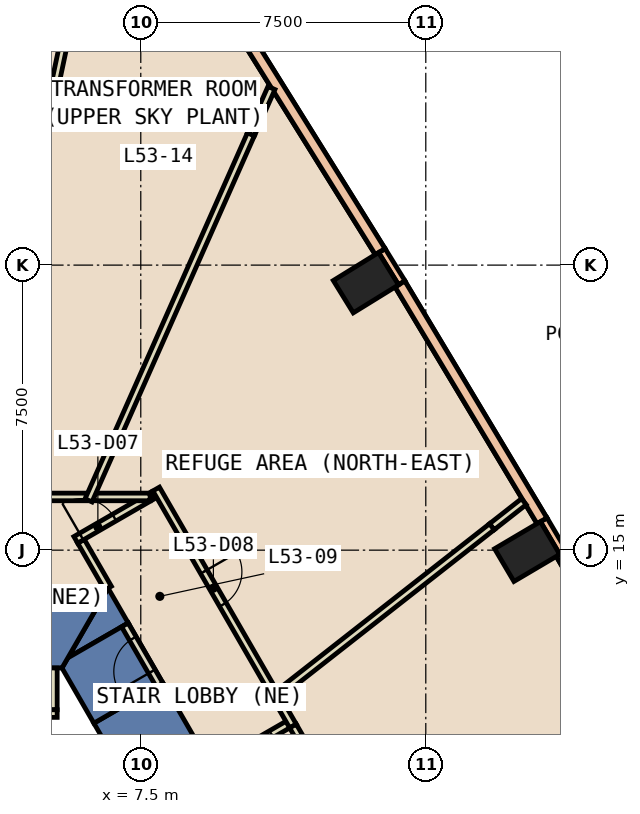
"""IFC4 building model, lengths in metres.
Left out: names, types, materials, properties, quantities, classifications, styles, units other than length and angle.
Written with IfcOpenShell. Run it as: python <this file> out.ifc"""

import sys

from ifc_helpers import new_model, si_unit, direction, frame, frame_2d, origin, origin_2d, place, context, subcontext, project, spatial, polyline, rectangle, outline, extrude, element, fill, save


model = new_model("IFC4")
c1 = context("Model", 3, precision=1e-05, world=origin(), true_north=direction((0.0, 1.0)))
c2 = subcontext(c1, "Body", "Model", "MODEL_VIEW")
j1 = project(units=[si_unit("LENGTHUNIT", "METRE"), si_unit("PLANEANGLEUNIT", "RADIAN")], contexts=[c1])
p1 = place(None, origin())
s1 = spatial("IfcSite", under=j1, at=p1, CompositionType="ELEMENT")
p2 = place(p1, origin())
s2 = spatial("IfcBuilding", under=s1, at=p2, CompositionType="ELEMENT")
p3 = place(p2, frame((0.0, 0.0, 236.0)))
s3 = spatial("IfcBuildingStorey", under=s2, at=p3, CompositionType="ELEMENT", Elevation=236.0)
for number, where, z_axis, x_axis in (
    (1, (17.668, 14.963, -0.6), (0.0, 0.0, 1.0), (-0.509, 0.861, 0.0)),
    (2, (13.425, 22.037, -0.6), (0.0, 0.0, 1.0), (-0.525, 0.851, 0.0)),
):
    element("IfcColumn", number, at=place(p3, frame(where, z_axis=z_axis, x_axis=x_axis)), inside=s3, PredefinedType="COLUMN", context=c2, shape_type="SweptSolid", body=[
        extrude(rectangle(XDim=1.0, YDim=1.4, at=origin_2d()), origin(), (0.0, 0.0, 1.0), 5.4),
    ])
p4 = place(p3, frame((0.0, 0.0, -0.6)))
e3 = element("IfcWall", 3, at=p4, inside=s3, PredefinedType="SHEAR", context=c2, shape_type="SweptSolid", body=[
    extrude(outline(polyline([(8.085, 11.498), (6.266, 10.447), (10.854, 2.5), (13.279, 2.5), (8.085, 11.498)])), origin(), (0.0, 0.0, 1.0), 5.4),
])
p5 = place(p3, frame((0.0, 0.0, -0.6)))
e4 = element("IfcWall", 4, at=p5, inside=s3, PredefinedType="SHEAR", context=c2, shape_type="SweptSolid", body=[
    extrude(outline(polyline([(5.58, 12.165), (7.17, 13.083), (6.64, 14.0), (5.58, 12.165)])), origin(), (0.0, 0.0, 1.0), 5.4),
])
p6 = place(p3, frame((0.0, 0.0, 3.6)))
e5 = element("IfcWall", 5, at=p6, inside=s3, PredefinedType="SHEAR", context=c2, shape_type="SweptSolid", body=[
    extrude(outline(polyline([(7.17, 13.083), (5.58, 12.165), (5.427, 11.9), (6.266, 10.447), (8.085, 11.498), (7.17, 13.083)])), origin(), (0.0, 0.0, 1.0), 1.2),
])
p7 = place(p3, frame((0.0, 0.0, -0.6)))
e6 = element("IfcWall", 6, at=p7, inside=s3, PredefinedType="SHEAR", context=c2, shape_type="SweptSolid", body=[
    extrude(outline(polyline([(6.64, 14.0), (-6.64, 14.0), (-5.427, 11.9), (5.427, 11.9), (6.64, 14.0)])), origin(), (0.0, 0.0, 1.0), 5.4),
])
p8 = place(p3, frame((18.611, 14.94, 0.0), z_axis=(0.0, 0.0, 1.0), x_axis=(-0.508161541526, 0.861261776531, 0.0)))
e7 = element("IfcWall", 7, at=p8, inside=s3, PredefinedType="STANDARD", context=c2, shape_type="SweptSolid", body=[
    extrude(rectangle(XDim=1.0, YDim=0.2, at=frame_2d((0.5, 0.0))), origin(), (0.0, 0.0, 1.0), 4.8),
])
p9 = place(p3, frame((14.369, 22.032, 0.0), z_axis=(0.0, 0.0, 1.0), x_axis=(-0.525648735675, 0.850701714282, 0.0)))
e8 = element("IfcWall", 8, at=p9, inside=s3, PredefinedType="STANDARD", context=c2, shape_type="SweptSolid", body=[
    extrude(rectangle(XDim=1.0, YDim=0.2, at=frame_2d((0.5, 0.0))), origin(), (0.0, 0.0, 1.0), 4.8),
])
p10 = place(p3, frame((22.196, 8.62, 0.0), z_axis=(0.0, 0.0, 1.0), x_axis=(-0.499980331134, 0.866036759312, 0.0)))
e9 = element("IfcWall", 9, at=p10, inside=s3, PredefinedType="STANDARD", context=c2, shape_type="SweptSolid", body=[
    extrude(rectangle(XDim=7.266, YDim=0.3, at=frame_2d((3.633, 0.0))), origin(), (0.0, 0.0, 1.0), 1.2),
])
p11 = place(p3, frame((22.196, 8.62, 4.0), z_axis=(0.0, 0.0, 1.0), x_axis=(-0.499980331134, 0.866036759312, 0.0)))
e10 = element("IfcWall", 10, at=p11, inside=s3, PredefinedType="STANDARD", context=c2, shape_type="SweptSolid", body=[
    extrude(rectangle(XDim=7.266, YDim=0.3, at=frame_2d((3.633, 0.0))), origin(), (0.0, 0.0, 1.0), 0.8),
])
p12 = place(p3, frame((18.057, 15.773, 0.0), z_axis=(0.0, 0.0, 1.0), x_axis=(-0.51437714024, 0.857564083669, 0.0)))
e11 = element("IfcWall", 11, at=p12, inside=s3, PredefinedType="STANDARD", context=c2, shape_type="SweptSolid", body=[
    extrude(rectangle(XDim=7.265, YDim=0.3, at=frame_2d((3.632, 0.0))), origin(), (0.0, 0.0, 1.0), 1.2),
])
p13 = place(p3, frame((18.057, 15.773, 4.0), z_axis=(0.0, 0.0, 1.0), x_axis=(-0.51437714024, 0.857564083669, 0.0)))
e12 = element("IfcWall", 12, at=p13, inside=s3, PredefinedType="STANDARD", context=c2, shape_type="SweptSolid", body=[
    extrude(rectangle(XDim=7.265, YDim=0.3, at=frame_2d((3.632, 0.0))), origin(), (0.0, 0.0, 1.0), 0.8),
])
p14 = place(p3, frame((13.799, 22.855, 0.0), z_axis=(0.0, 0.0, 1.0), x_axis=(-0.528961462244, 0.848645845722, 0.0)))
e13 = element("IfcWall", 13, at=p14, inside=s3, PredefinedType="STANDARD", context=c2, shape_type="SweptSolid", body=[
    extrude(rectangle(XDim=7.47, YDim=0.3, at=frame_2d((3.735, 0.0))), origin(), (0.0, 0.0, 1.0), 1.2),
])
p15 = place(p3, frame((13.799, 22.855, 4.0), z_axis=(0.0, 0.0, 1.0), x_axis=(-0.528961462244, 0.848645845722, 0.0)))
e14 = element("IfcWall", 14, at=p15, inside=s3, PredefinedType="STANDARD", context=c2, shape_type="SweptSolid", body=[
    extrude(rectangle(XDim=7.47, YDim=0.3, at=frame_2d((3.735, 0.0))), origin(), (0.0, 0.0, 1.0), 0.8),
])
p16 = place(p3, frame((5.2, 11.9, 0.0), z_axis=(0.0, 0.0, 1.0), x_axis=(0.0, -1.0, 0.0)))
e15 = element("IfcWall", 15, at=p16, inside=s3, PredefinedType="PARTITIONING", context=c2, shape_type="SweptSolid", body=[
    extrude(rectangle(XDim=1.1, YDim=0.2, at=frame_2d((0.55, 0.0))), origin(), (0.0, 0.0, 1.0), 4.8),
])
p17 = place(p3, frame((5.3, 10.7, 0.0), z_axis=(0.0, 0.0, 1.0), x_axis=(-1.0, 0.0, 0.0)))
e16 = element("IfcWall", 16, at=p17, inside=s3, PredefinedType="PARTITIONING", context=c2, shape_type="SweptSolid", body=[
    extrude(rectangle(XDim=2.8, YDim=0.2, at=frame_2d((1.4, 0.0))), origin(), (0.0, 0.0, 1.0), 4.8),
])
p18 = place(p17, frame((0.95, 0.0, 0.0)))
e17 = element("IfcOpeningElement", 17, at=p18, cuts=e16, PredefinedType="OPENING", context=c2, shape_type="SweptSolid", body=[
    extrude(rectangle(XDim=0.9, YDim=2.1, at=frame_2d((0.45, 1.05))), frame((0.0, 0.11, 0.0), z_axis=(0.0, -1.0, 0.0), x_axis=(1.0, 0.0, 0.0)), (0.0, 0.0, 1.0), 0.22),
])
p19 = place(p3, frame((11.455, 10.459, 0.0), z_axis=(0.0, 0.0, 1.0), x_axis=(-0.865999212041, -0.500045362686, 0.0)))
e18 = element("IfcWall", 18, at=p19, inside=s3, PredefinedType="PARTITIONING", context=c2, shape_type="SweptSolid", body=[
    extrude(rectangle(XDim=2.4, YDim=0.2, at=frame_2d((1.2, 0.0))), origin(), (0.0, 0.0, 1.0), 2.4),
])
p20 = place(p19, frame((0.6, 0.0, 0.0)))
e19 = element("IfcOpeningElement", 19, at=p20, cuts=e18, PredefinedType="OPENING", context=c2, shape_type="SweptSolid", body=[
    extrude(rectangle(XDim=1.0, YDim=2.1, at=frame_2d((0.5, 1.05))), frame((0.0, 0.11, 0.0), z_axis=(0.0, -1.0, 0.0), x_axis=(1.0, 0.0, 0.0)), (0.0, 0.0, 1.0), 0.22),
])
p21 = place(p3, frame((6.64, 14.0, 0.0), z_axis=(0.0, 0.0, 1.0), x_axis=(-0.500266180458, 0.865871669874, 0.0)))
e20 = element("IfcWall", 20, at=p21, inside=s3, PredefinedType="PARTITIONING", context=c2, shape_type="SweptSolid", body=[
    extrude(rectangle(XDim=1.425, YDim=0.2, at=frame_2d((0.712, 0.0))), origin(), (0.0, 0.0, 1.0), 4.8),
])
p22 = place(p3, frame((5.79, 15.271, 0.0), z_axis=(0.0, 0.0, 1.0), x_axis=(0.866023505087, 0.500003288626, 0.0)))
e21 = element("IfcWall", 21, at=p22, inside=s3, PredefinedType="PARTITIONING", context=c2, shape_type="SweptSolid", body=[
    extrude(rectangle(XDim=2.358, YDim=0.2, at=frame_2d((1.179, 0.0))), origin(), (0.0, 0.0, 1.0), 4.8),
])
p23 = place(p22, frame((0.171, 0.0, 0.0)))
e22 = element("IfcOpeningElement", 22, at=p23, cuts=e21, PredefinedType="OPENING", context=c2, shape_type="SweptSolid", body=[
    extrude(rectangle(XDim=1.0, YDim=2.1, at=frame_2d((0.5, 1.05))), frame((0.0, 0.11, 0.0), z_axis=(0.0, -1.0, 0.0), x_axis=(1.0, 0.0, 0.0)), (0.0, 0.0, 1.0), 0.22),
])
p24 = place(p3, frame((7.905, 16.608, 0.0), z_axis=(0.0, 0.0, 1.0), x_axis=(0.499957262057, -0.866050077142, 0.0)))
e23 = element("IfcWall", 23, at=p24, inside=s3, PredefinedType="PARTITIONING", context=c2, shape_type="SweptSolid", body=[
    extrude(rectangle(XDim=7.2, YDim=0.2, at=frame_2d((3.6, 0.0))), origin(), (0.0, 0.0, 1.0), 4.8),
])
p25 = place(p24, frame((2.512, 0.0, 0.0)))
e24 = element("IfcOpeningElement", 24, at=p25, cuts=e23, PredefinedType="OPENING", context=c2, shape_type="SweptSolid", body=[
    extrude(rectangle(XDim=1.0, YDim=2.1, at=frame_2d((0.5, 1.05))), frame((0.0, 0.11, 0.0), z_axis=(0.0, -1.0, 0.0), x_axis=(1.0, 0.0, 0.0)), (0.0, 0.0, 1.0), 0.22),
])
p26 = place(p3, frame((11.505, 10.372, 0.0), z_axis=(0.0, 0.0, 1.0), x_axis=(0.500335529221, -0.865831599215, 0.0)))
e25 = element("IfcWall", 25, at=p26, inside=s3, PredefinedType="PARTITIONING", context=c2, shape_type="SweptSolid", body=[
    extrude(rectangle(XDim=0.632, YDim=0.2, at=frame_2d((0.316, 0.0))), origin(), (0.0, 0.0, 1.0), 2.4),
])
p27 = place(p3, frame((6.266, 16.4, 0.0), z_axis=(0.0, 0.0, 1.0), x_axis=(1.0, 0.0, 0.0)))
e26 = element("IfcWall", 26, at=p27, inside=s3, PredefinedType="PARTITIONING", context=c2, shape_type="SweptSolid", body=[
    extrude(rectangle(XDim=1.479, YDim=0.2, at=frame_2d((0.74, 0.0))), origin(), (0.0, 0.0, 1.0), 4.8),
])
p28 = place(p3, frame((3.044, 16.4, 0.0), z_axis=(0.0, 0.0, 1.0), x_axis=(1.0, 0.0, 0.0)))
e27 = element("IfcWall", 27, at=p28, inside=s3, PredefinedType="PARTITIONING", context=c2, shape_type="SweptSolid", body=[
    extrude(rectangle(XDim=3.022, YDim=0.2, at=frame_2d((1.511, 0.0))), origin(), (0.0, 0.0, 1.0), 4.8),
])
p29 = place(p28, frame((0.844, 0.0, 0.0)))
e28 = element("IfcOpeningElement", 28, at=p29, cuts=e27, PredefinedType="OPENING", context=c2, shape_type="SweptSolid", body=[
    extrude(rectangle(XDim=1.0, YDim=2.1, at=frame_2d((0.5, 1.05))), frame((0.0, 0.11, 0.0), z_axis=(0.0, -1.0, 0.0), x_axis=(1.0, 0.0, 0.0)), (0.0, 0.0, 1.0), 0.22),
])
p30 = place(p3, frame((17.581, 16.276, 0.0), z_axis=(0.0, 0.0, 1.0), x_axis=(-0.78699011443, -0.61696560665, 0.0)))
e29 = element("IfcWall", 29, at=p30, inside=s3, PredefinedType="PARTITIONING", context=c2, shape_type="SweptSolid", body=[
    extrude(rectangle(XDim=1.071, YDim=0.2, at=frame_2d((0.536, 0.0))), origin(), (0.0, 0.0, 1.0), 2.4),
])
p31 = place(p3, frame((6.125, 16.309, 0.0), z_axis=(0.0, 0.0, 1.0), x_axis=(0.405480740136, 0.914103587882, 0.0)))
e30 = element("IfcWall", 30, at=p31, inside=s3, PredefinedType="PARTITIONING", context=c2, shape_type="SweptSolid", body=[
    extrude(rectangle(XDim=10.54, YDim=0.2, at=frame_2d((5.27, 0.0))), origin(), (0.0, 0.0, 1.0), 4.8),
])
p32 = place(p3, frame((7.998, 11.448, 0.0), z_axis=(0.0, 0.0, 1.0), x_axis=(-0.500215337403, 0.865901042976, 0.0)))
e31 = element("IfcWall", 31, at=p32, inside=s3, PredefinedType="PARTITIONING", context=c2, shape_type="SweptSolid", body=[
    extrude(rectangle(XDim=1.829, YDim=0.2, at=frame_2d((0.915, 0.0))), origin(), (0.0, 0.0, 1.0), 2.4),
])
p33 = place(p32, frame((0.415, 0.0, 0.0)))
e32 = element("IfcOpeningElement", 32, at=p33, cuts=e31, PredefinedType="OPENING", context=c2, shape_type="SweptSolid", body=[
    extrude(rectangle(XDim=1.0, YDim=2.1, at=frame_2d((0.5, 1.05))), frame((0.0, 0.11, 0.0), z_axis=(0.0, -1.0, 0.0), x_axis=(1.0, 0.0, 0.0)), (0.0, 0.0, 1.0), 0.22),
])
p34 = place(p3, frame((16.738, 15.615, 0.0), z_axis=(0.0, 0.0, 1.0), x_axis=(-0.787145477979, -0.616767376323, 0.0)))
e33 = element("IfcWall", 33, at=p34, inside=s3, PredefinedType="PARTITIONING", context=c2, shape_type="SweptSolid", body=[
    extrude(rectangle(XDim=7.225, YDim=0.2, at=frame_2d((3.612, 0.0))), origin(), (0.0, 0.0, 1.0), 4.8),
])
p35 = place(p3, frame((10.399, 25.944, 0.0), z_axis=(0.0, 0.0, 1.0), x_axis=(0.405661971111, 0.914023175414, 0.0)))
e34 = element("IfcWall", 34, at=p35, inside=s3, PredefinedType="PARTITIONING", context=c2, shape_type="SweptSolid", body=[
    extrude(rectangle(XDim=1.331, YDim=0.2, at=frame_2d((0.666, 0.0))), origin(), (0.0, 0.0, 1.0), 2.4),
])
p36 = place(p3, frame((4.078, 21.753, 0.0), z_axis=(0.0, 0.0, 1.0), x_axis=(0.207313040937, 0.978274656248, 0.0)))
e35 = element("IfcWall", 35, at=p36, inside=s3, PredefinedType="PARTITIONING", context=c2, shape_type="SweptSolid", body=[
    extrude(rectangle(XDim=10.333, YDim=0.2, at=frame_2d((5.166, 0.0))), origin(), (0.0, 0.0, 1.0), 4.8),
])
p37 = place(p20, origin())
e36 = element("IfcDoor", 36, at=p37, inside=s3, OperationType="SINGLE_SWING_RIGHT", PredefinedType="DOOR", context=c2, shape_type="SweptSolid", body=[
    extrude(rectangle(XDim=1.0, YDim=2.1, at=frame_2d((0.5, 1.05))), frame((0.0, 0.025, 0.0), z_axis=(0.0, -1.0, 0.0), x_axis=(1.0, 0.0, 0.0)), (0.0, 0.0, 1.0), 0.05),
])
fill(e19, e36)
p38 = place(p23, origin())
e37 = element("IfcDoor", 37, at=p38, inside=s3, OperationType="SINGLE_SWING_LEFT", PredefinedType="DOOR", context=c2, shape_type="SweptSolid", body=[
    extrude(rectangle(XDim=1.0, YDim=2.1, at=frame_2d((0.5, 1.05))), frame((0.0, 0.025, 0.0), z_axis=(0.0, -1.0, 0.0), x_axis=(1.0, 0.0, 0.0)), (0.0, 0.0, 1.0), 0.05),
])
fill(e22, e37)
p39 = place(p25, origin())
e38 = element("IfcDoor", 38, at=p39, inside=s3, OperationType="SINGLE_SWING_RIGHT", PredefinedType="DOOR", context=c2, shape_type="SweptSolid", body=[
    extrude(rectangle(XDim=1.0, YDim=2.1, at=frame_2d((0.5, 1.05))), frame((0.0, 0.025, 0.0), z_axis=(0.0, -1.0, 0.0), x_axis=(1.0, 0.0, 0.0)), (0.0, 0.0, 1.0), 0.05),
])
fill(e24, e38)
p40 = place(p33, origin())
e39 = element("IfcDoor", 39, at=p40, inside=s3, OperationType="SINGLE_SWING_LEFT", PredefinedType="DOOR", context=c2, shape_type="SweptSolid", body=[
    extrude(rectangle(XDim=1.0, YDim=2.1, at=frame_2d((0.5, 1.05))), frame((0.0, 0.025, 0.0), z_axis=(0.0, -1.0, 0.0), x_axis=(1.0, 0.0, 0.0)), (0.0, 0.0, 1.0), 0.05),
])
fill(e32, e39)
save(model, sys.argv[1])
